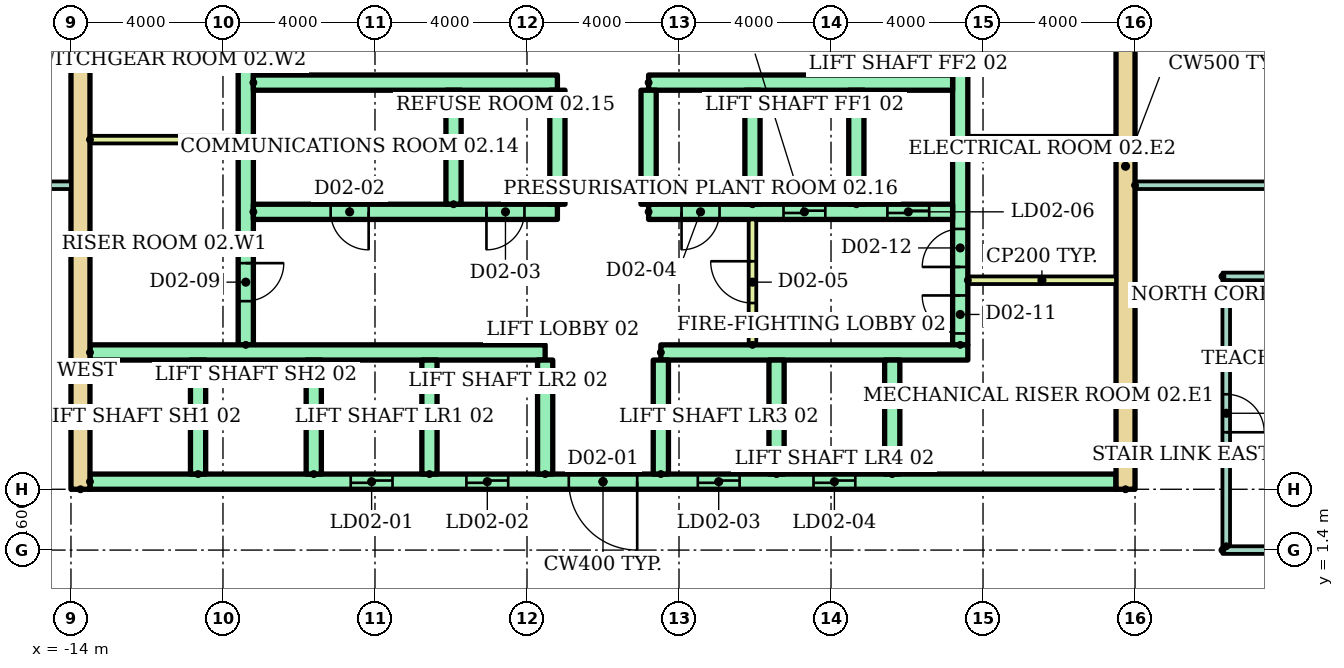
"""IFC4 building model, lengths in metres.
Left out: names, types, materials, properties, quantities, classifications, styles, units other than length and angle.
Written with IfcOpenShell. Run it as: python <this file> out.ifc"""

import sys

from ifc_helpers import new_model, si_unit, direction, frame, frame_2d, origin, place, context, subcontext, project, spatial, rectangle, extrude, element, fill, save


model = new_model("IFC4")
c1 = context("Model", 3, precision=1e-05, world=origin(), true_north=direction((0.0, 1.0)))
c2 = subcontext(c1, "Body", "Model", "MODEL_VIEW")
j1 = project(units=[si_unit("LENGTHUNIT", "METRE"), si_unit("PLANEANGLEUNIT", "RADIAN")], contexts=[c1])
p1 = place(None, origin())
s1 = spatial("IfcSite", under=j1, at=p1, CompositionType="ELEMENT")
p2 = place(p1, origin())
s2 = spatial("IfcBuilding", under=s1, at=p2, CompositionType="ELEMENT")
p3 = place(p2, frame((0.0, 0.0, 10.0)))
s3 = spatial("IfcBuildingStorey", under=s2, at=p3, CompositionType="ELEMENT", Elevation=10.0)
for number, where, z_axis, x_axis in (
    (1, (-13.75, 3.0, 0.0), (0.0, 0.0, 1.0), (0.0, 1.0, 0.0)),
    (2, (13.75, 3.0, 0.0), (0.0, 0.0, 1.0), (0.0, 1.0, 0.0)),
):
    element("IfcWall", number, at=place(p3, frame(where, z_axis=z_axis, x_axis=x_axis)), inside=s3, PredefinedType="SHEAR", context=c2, shape_type="SweptSolid", body=[
        extrude(rectangle(XDim=17.0, YDim=0.5, at=frame_2d((8.5, 0.0))), origin(), (0.0, 0.0, 1.0), 3.7),
    ])
p4 = place(p3, frame((-9.4, 6.8, 0.0), z_axis=(0.0, 0.0, 1.0), x_axis=(0.0, 1.0, 0.0)))
e3 = element("IfcWall", 3, at=p4, inside=s3, PredefinedType="SHEAR", context=c2, shape_type="SweptSolid", body=[
    extrude(rectangle(XDim=12.7, YDim=0.4, at=frame_2d((6.35, 0.0))), origin(), (0.0, 0.0, 1.0), 3.7),
])
p5 = place(p4, frame((1.15, 0.0, 0.0)))
e4 = element("IfcOpeningElement", 4, at=p5, cuts=e3, PredefinedType="OPENING", context=c2, shape_type="SweptSolid", body=[
    extrude(rectangle(XDim=1.0, YDim=2.1, at=frame_2d((0.5, 1.05))), frame((0.0, 0.21, 0.0), z_axis=(0.0, -1.0, 0.0), x_axis=(1.0, 0.0, 0.0)), (0.0, 0.0, 1.0), 0.42),
])
p6 = place(p4, frame((7.925, 0.0, 0.0)))
e5 = element("IfcOpeningElement", 5, at=p6, cuts=e3, PredefinedType="OPENING", context=c2, shape_type="SweptSolid", body=[
    extrude(rectangle(XDim=1.0, YDim=2.1, at=frame_2d((0.5, 1.05))), frame((0.0, 0.21, 0.0), z_axis=(0.0, -1.0, 0.0), x_axis=(1.0, 0.0, 0.0)), (0.0, 0.0, 1.0), 0.42),
])
p7 = place(p3, frame((9.4, 6.8, 0.0), z_axis=(0.0, 0.0, 1.0), x_axis=(0.0, 1.0, 0.0)))
e6 = element("IfcWall", 6, at=p7, inside=s3, PredefinedType="SHEAR", context=c2, shape_type="SweptSolid", body=[
    extrude(rectangle(XDim=12.7, YDim=0.4, at=frame_2d((6.35, 0.0))), origin(), (0.0, 0.0, 1.0), 3.7),
])
p8 = place(p7, frame((0.3, 0.0, 0.0)))
e7 = element("IfcOpeningElement", 7, at=p8, cuts=e6, PredefinedType="OPENING", context=c2, shape_type="SweptSolid", body=[
    extrude(rectangle(XDim=1.0, YDim=2.1, at=frame_2d((0.5, 1.05))), frame((0.0, 0.21, 0.0), z_axis=(0.0, -1.0, 0.0), x_axis=(1.0, 0.0, 0.0)), (0.0, 0.0, 1.0), 0.42),
])
p9 = place(p7, frame((2.05, 0.0, 0.0)))
e8 = element("IfcOpeningElement", 8, at=p9, cuts=e6, PredefinedType="OPENING", context=c2, shape_type="SweptSolid", body=[
    extrude(rectangle(XDim=1.0, YDim=2.1, at=frame_2d((0.5, 1.05))), frame((0.0, 0.21, 0.0), z_axis=(0.0, -1.0, 0.0), x_axis=(1.0, 0.0, 0.0)), (0.0, 0.0, 1.0), 0.42),
])
p10 = place(p7, frame((7.925, 0.0, 0.0)))
e9 = element("IfcOpeningElement", 9, at=p10, cuts=e6, PredefinedType="OPENING", context=c2, shape_type="SweptSolid", body=[
    extrude(rectangle(XDim=1.0, YDim=2.1, at=frame_2d((0.5, 1.05))), frame((0.0, 0.21, 0.0), z_axis=(0.0, -1.0, 0.0), x_axis=(1.0, 0.0, 0.0)), (0.0, 0.0, 1.0), 0.42),
])
p11 = place(p3, frame((-13.5, 3.2, 0.0)))
e10 = element("IfcWall", 10, at=p11, inside=s3, PredefinedType="SHEAR", context=c2, shape_type="SweptSolid", body=[
    extrude(rectangle(XDim=27.0, YDim=0.4, at=frame_2d((13.5, 0.0))), origin(), (0.0, 0.0, 1.0), 3.7),
])
p12 = place(p11, frame((6.861, 0.0, 0.0)))
e11 = element("IfcOpeningElement", 11, at=p12, cuts=e10, PredefinedType="OPENING", context=c2, shape_type="SweptSolid", body=[
    extrude(rectangle(XDim=1.1, YDim=2.1, at=frame_2d((0.55, 1.05))), frame((0.0, 0.21, 0.0), z_axis=(0.0, -1.0, 0.0), x_axis=(1.0, 0.0, 0.0)), (0.0, 0.0, 1.0), 0.42),
])
p13 = place(p11, frame((9.906, 0.0, 0.0)))
e12 = element("IfcOpeningElement", 12, at=p13, cuts=e10, PredefinedType="OPENING", context=c2, shape_type="SweptSolid", body=[
    extrude(rectangle(XDim=1.1, YDim=2.1, at=frame_2d((0.55, 1.05))), frame((0.0, 0.21, 0.0), z_axis=(0.0, -1.0, 0.0), x_axis=(1.0, 0.0, 0.0)), (0.0, 0.0, 1.0), 0.42),
])
p14 = place(p11, frame((15.994, 0.0, 0.0)))
e13 = element("IfcOpeningElement", 13, at=p14, cuts=e10, PredefinedType="OPENING", context=c2, shape_type="SweptSolid", body=[
    extrude(rectangle(XDim=1.1, YDim=2.1, at=frame_2d((0.55, 1.05))), frame((0.0, 0.21, 0.0), z_axis=(0.0, -1.0, 0.0), x_axis=(1.0, 0.0, 0.0)), (0.0, 0.0, 1.0), 0.42),
])
p15 = place(p11, frame((19.039, 0.0, 0.0)))
e14 = element("IfcOpeningElement", 14, at=p15, cuts=e10, PredefinedType="OPENING", context=c2, shape_type="SweptSolid", body=[
    extrude(rectangle(XDim=1.1, YDim=2.1, at=frame_2d((0.55, 1.05))), frame((0.0, 0.21, 0.0), z_axis=(0.0, -1.0, 0.0), x_axis=(1.0, 0.0, 0.0)), (0.0, 0.0, 1.0), 0.42),
])
p16 = place(p11, frame((12.6, 0.0, 0.0)))
e15 = element("IfcOpeningElement", 15, at=p16, cuts=e10, PredefinedType="OPENING", context=c2, shape_type="SweptSolid", body=[
    extrude(rectangle(XDim=1.8, YDim=2.1, at=frame_2d((0.9, 1.05))), frame((0.0, 0.21, 0.0), z_axis=(0.0, -1.0, 0.0), x_axis=(1.0, 0.0, 0.0)), (0.0, 0.0, 1.0), 0.42),
])
p17 = place(p3, frame((-13.5, 6.6, 0.0)))
e16 = element("IfcWall", 16, at=p17, inside=s3, PredefinedType="SHEAR", context=c2, shape_type="SweptSolid", body=[
    extrude(rectangle(XDim=11.978, YDim=0.4, at=frame_2d((5.989, 0.0))), origin(), (0.0, 0.0, 1.0), 3.7),
])
p18 = place(p3, frame((1.522, 6.6, 0.0)))
e17 = element("IfcWall", 17, at=p18, inside=s3, PredefinedType="SHEAR", context=c2, shape_type="SweptSolid", body=[
    extrude(rectangle(XDim=8.078, YDim=0.4, at=frame_2d((4.039, 0.0))), origin(), (0.0, 0.0, 1.0), 3.7),
])
for number, where, z_axis, x_axis in (
    (18, (-10.656, 3.4, 0.0), (0.0, 0.0, 1.0), (0.0, 1.0, 0.0)),
    (19, (-7.611, 3.4, 0.0), (0.0, 0.0, 1.0), (0.0, 1.0, 0.0)),
    (20, (-4.567, 3.4, 0.0), (0.0, 0.0, 1.0), (0.0, 1.0, 0.0)),
    (21, (-1.522, 3.4, 0.0), (0.0, 0.0, 1.0), (0.0, 1.0, 0.0)),
    (22, (1.522, 3.4, 0.0), (0.0, 0.0, 1.0), (0.0, 1.0, 0.0)),
    (23, (4.567, 3.4, 0.0), (0.0, 0.0, 1.0), (0.0, 1.0, 0.0)),
    (24, (7.611, 3.4, 0.0), (0.0, 0.0, 1.0), (0.0, 1.0, 0.0)),
):
    element("IfcWall", number, at=place(p3, frame(where, z_axis=z_axis, x_axis=x_axis)), inside=s3, PredefinedType="SHEAR", context=c2, shape_type="SweptSolid", body=[
        extrude(rectangle(XDim=3.0, YDim=0.4, at=frame_2d((1.5, 0.0))), origin(), (0.0, 0.0, 1.0), 3.7),
    ])
p19 = place(p3, frame((-9.2, 10.3, 0.0)))
e25 = element("IfcWall", 25, at=p19, inside=s3, PredefinedType="SHEAR", context=c2, shape_type="SweptSolid", body=[
    extrude(rectangle(XDim=8.0, YDim=0.4, at=frame_2d((4.0, 0.0))), origin(), (0.0, 0.0, 1.0), 3.7),
])
p20 = place(p19, frame((2.033, 0.0, 0.0)))
e26 = element("IfcOpeningElement", 26, at=p20, cuts=e25, PredefinedType="OPENING", context=c2, shape_type="SweptSolid", body=[
    extrude(rectangle(XDim=1.0, YDim=2.1, at=frame_2d((0.5, 1.05))), frame((0.0, 0.21, 0.0), z_axis=(0.0, -1.0, 0.0), x_axis=(1.0, 0.0, 0.0)), (0.0, 0.0, 1.0), 0.42),
])
p21 = place(p19, frame((6.133, 0.0, 0.0)))
e27 = element("IfcOpeningElement", 27, at=p21, cuts=e25, PredefinedType="OPENING", context=c2, shape_type="SweptSolid", body=[
    extrude(rectangle(XDim=1.0, YDim=2.1, at=frame_2d((0.5, 1.05))), frame((0.0, 0.21, 0.0), z_axis=(0.0, -1.0, 0.0), x_axis=(1.0, 0.0, 0.0)), (0.0, 0.0, 1.0), 0.42),
])
p22 = place(p3, frame((-9.2, 13.7, 0.0)))
e28 = element("IfcWall", 28, at=p22, inside=s3, PredefinedType="SHEAR", context=c2, shape_type="SweptSolid", body=[
    extrude(rectangle(XDim=8.0, YDim=0.4, at=frame_2d((4.0, 0.0))), origin(), (0.0, 0.0, 1.0), 3.7),
])
p23 = place(p3, frame((1.2, 10.3, 0.0)))
e29 = element("IfcWall", 29, at=p23, inside=s3, PredefinedType="SHEAR", context=c2, shape_type="SweptSolid", body=[
    extrude(rectangle(XDim=8.0, YDim=0.4, at=frame_2d((4.0, 0.0))), origin(), (0.0, 0.0, 1.0), 3.7),
])
p24 = place(p23, frame((3.55, 0.0, 0.0)))
e30 = element("IfcOpeningElement", 30, at=p24, cuts=e29, PredefinedType="OPENING", context=c2, shape_type="SweptSolid", body=[
    extrude(rectangle(XDim=1.1, YDim=2.1, at=frame_2d((0.55, 1.05))), frame((0.0, 0.21, 0.0), z_axis=(0.0, -1.0, 0.0), x_axis=(1.0, 0.0, 0.0)), (0.0, 0.0, 1.0), 0.42),
])
p25 = place(p23, frame((6.283, 0.0, 0.0)))
e31 = element("IfcOpeningElement", 31, at=p25, cuts=e29, PredefinedType="OPENING", context=c2, shape_type="SweptSolid", body=[
    extrude(rectangle(XDim=1.1, YDim=2.1, at=frame_2d((0.55, 1.05))), frame((0.0, 0.21, 0.0), z_axis=(0.0, -1.0, 0.0), x_axis=(1.0, 0.0, 0.0)), (0.0, 0.0, 1.0), 0.42),
])
p26 = place(p23, frame((0.867, 0.0, 0.0)))
e32 = element("IfcOpeningElement", 32, at=p26, cuts=e29, PredefinedType="OPENING", context=c2, shape_type="SweptSolid", body=[
    extrude(rectangle(XDim=1.0, YDim=2.1, at=frame_2d((0.5, 1.05))), frame((0.0, 0.21, 0.0), z_axis=(0.0, -1.0, 0.0), x_axis=(1.0, 0.0, 0.0)), (0.0, 0.0, 1.0), 0.42),
])
p27 = place(p3, frame((1.2, 13.7, 0.0)))
e33 = element("IfcWall", 33, at=p27, inside=s3, PredefinedType="SHEAR", context=c2, shape_type="SweptSolid", body=[
    extrude(rectangle(XDim=8.0, YDim=0.4, at=frame_2d((4.0, 0.0))), origin(), (0.0, 0.0, 1.0), 3.7),
])
for number, where, z_axis, x_axis in (
    (34, (-3.933, 10.5, 0.0), (0.0, 0.0, 1.0), (0.0, 1.0, 0.0)),
    (35, (-1.2, 10.5, 0.0), (0.0, 0.0, 1.0), (0.0, 1.0, 0.0)),
    (36, (1.2, 10.5, 0.0), (0.0, 0.0, 1.0), (0.0, 1.0, 0.0)),
    (37, (3.933, 10.5, 0.0), (0.0, 0.0, 1.0), (0.0, 1.0, 0.0)),
    (38, (6.667, 10.5, 0.0), (0.0, 0.0, 1.0), (0.0, 1.0, 0.0)),
):
    element("IfcWall", number, at=place(p3, frame(where, z_axis=z_axis, x_axis=x_axis)), inside=s3, PredefinedType="SHEAR", context=c2, shape_type="SweptSolid", body=[
        extrude(rectangle(XDim=3.0, YDim=0.4, at=frame_2d((1.5, 0.0))), origin(), (0.0, 0.0, 1.0), 3.7),
    ])
p28 = place(p3, frame((3.933, 6.8, 0.0), z_axis=(0.0, 0.0, 1.0), x_axis=(0.0, 1.0, 0.0)))
e39 = element("IfcWall", 39, at=p28, inside=s3, PredefinedType="PARTITIONING", context=c2, shape_type="SweptSolid", body=[
    extrude(rectangle(XDim=3.3, YDim=0.2, at=frame_2d((1.65, 0.0))), origin(), (0.0, 0.0, 1.0), 3.7),
])
p29 = place(p28, frame((1.1, 0.0, 0.0)))
e40 = element("IfcOpeningElement", 40, at=p29, cuts=e39, PredefinedType="OPENING", context=c2, shape_type="SweptSolid", body=[
    extrude(rectangle(XDim=1.1, YDim=2.1, at=frame_2d((0.55, 1.05))), frame((0.0, 0.11, 0.0), z_axis=(0.0, -1.0, 0.0), x_axis=(1.0, 0.0, 0.0)), (0.0, 0.0, 1.0), 0.22),
])
for number, where in (
    (41, (-13.5, 12.2, 0.0)),
    (42, (9.6, 8.5, 0.0)),
    (43, (9.6, 12.2, 0.0)),
):
    element("IfcWall", number, at=place(p3, frame(where)), inside=s3, PredefinedType="PARTITIONING", context=c2, shape_type="SweptSolid", body=[
        extrude(rectangle(XDim=3.9, YDim=0.2, at=frame_2d((1.95, 0.0))), origin(), (0.0, 0.0, 1.0), 3.7),
    ])
p30 = place(p3, frame((16.3, 1.4, 0.0)))
e44 = element("IfcWall", 44, at=p30, inside=s3, PredefinedType="PARTITIONING", context=c2, shape_type="SweptSolid", body=[
    extrude(rectangle(XDim=20.6, YDim=0.2, at=frame_2d((10.3, 0.0))), origin(), (0.0, 0.0, 1.0), 3.7),
])
p31 = place(p30, frame((8.05, 0.0, 0.0)))
e45 = element("IfcOpeningElement", 45, at=p31, cuts=e44, PredefinedType="OPENING", context=c2, shape_type="SweptSolid", body=[
    extrude(rectangle(XDim=1.0, YDim=2.1, at=frame_2d((0.5, 1.05))), frame((0.0, 0.11, 0.0), z_axis=(0.0, -1.0, 0.0), x_axis=(1.0, 0.0, 0.0)), (0.0, 0.0, 1.0), 0.22),
])
p32 = place(p30, frame((12.4, 0.0, 0.0)))
e46 = element("IfcOpeningElement", 46, at=p32, cuts=e44, PredefinedType="OPENING", context=c2, shape_type="SweptSolid", body=[
    extrude(rectangle(XDim=1.0, YDim=2.1, at=frame_2d((0.5, 1.05))), frame((0.0, 0.11, 0.0), z_axis=(0.0, -1.0, 0.0), x_axis=(1.0, 0.0, 0.0)), (0.0, 0.0, 1.0), 0.22),
])
p33 = place(p30, frame((16.05, 0.0, 0.0)))
e47 = element("IfcOpeningElement", 47, at=p33, cuts=e44, PredefinedType="OPENING", context=c2, shape_type="SweptSolid", body=[
    extrude(rectangle(XDim=1.0, YDim=2.1, at=frame_2d((0.5, 1.05))), frame((0.0, 0.11, 0.0), z_axis=(0.0, -1.0, 0.0), x_axis=(1.0, 0.0, 0.0)), (0.0, 0.0, 1.0), 0.22),
])
p34 = place(p3, frame((16.3, 8.6, 0.0)))
e48 = element("IfcWall", 48, at=p34, inside=s3, PredefinedType="PARTITIONING", context=c2, shape_type="SweptSolid", body=[
    extrude(rectangle(XDim=21.3, YDim=0.2, at=frame_2d((10.65, 0.0))), origin(), (0.0, 0.0, 1.0), 3.7),
])
p35 = place(p3, frame((-21.5, 11.0, 0.0)))
e49 = element("IfcWall", 49, at=p35, inside=s3, PredefinedType="PARTITIONING", context=c2, shape_type="SweptSolid", body=[
    extrude(rectangle(XDim=7.5, YDim=0.2, at=frame_2d((3.75, 0.0))), origin(), (0.0, 0.0, 1.0), 3.7),
])
p36 = place(p35, frame((0.35, 0.0, 0.0)))
e50 = element("IfcOpeningElement", 50, at=p36, cuts=e49, PredefinedType="OPENING", context=c2, shape_type="SweptSolid", body=[
    extrude(rectangle(XDim=1.0, YDim=2.1, at=frame_2d((0.5, 1.05))), frame((0.0, 0.11, 0.0), z_axis=(0.0, -1.0, 0.0), x_axis=(1.0, 0.0, 0.0)), (0.0, 0.0, 1.0), 0.22),
])
p37 = place(p35, frame((4.14, 0.0, 0.0)))
e51 = element("IfcOpeningElement", 51, at=p37, cuts=e49, PredefinedType="OPENING", context=c2, shape_type="SweptSolid", body=[
    extrude(rectangle(XDim=1.0, YDim=2.1, at=frame_2d((0.5, 1.05))), frame((0.0, 0.11, 0.0), z_axis=(0.0, -1.0, 0.0), x_axis=(1.0, 0.0, 0.0)), (0.0, 0.0, 1.0), 0.22),
])
p38 = place(p3, frame((14.0, 11.0, 0.0)))
e52 = element("IfcWall", 52, at=p38, inside=s3, PredefinedType="PARTITIONING", context=c2, shape_type="SweptSolid", body=[
    extrude(rectangle(XDim=3.5, YDim=0.2, at=frame_2d((1.75, 0.0))), origin(), (0.0, 0.0, 1.0), 3.7),
])
p39 = place(p3, frame((16.4, 1.5, 0.0), z_axis=(0.0, 0.0, 1.0), x_axis=(0.0, 1.0, 0.0)))
e53 = element("IfcWall", 53, at=p39, inside=s3, PredefinedType="PARTITIONING", context=c2, shape_type="SweptSolid", body=[
    extrude(rectangle(XDim=7.0, YDim=0.2, at=frame_2d((3.5, 0.0))), origin(), (0.0, 0.0, 1.0), 3.7),
])
p40 = place(p39, frame((3.0, 0.0, 0.0)))
e54 = element("IfcOpeningElement", 54, at=p40, cuts=e53, PredefinedType="OPENING", context=c2, shape_type="SweptSolid", body=[
    extrude(rectangle(XDim=1.0, YDim=2.1, at=frame_2d((0.5, 1.05))), frame((0.0, 0.11, 0.0), z_axis=(0.0, -1.0, 0.0), x_axis=(1.0, 0.0, 0.0)), (0.0, 0.0, 1.0), 0.22),
])
p41 = place(p12, origin())
e55 = element("IfcDoor", 55, at=p41, inside=s3, OperationType="SLIDING_TO_LEFT", PredefinedType="DOOR", context=c2, shape_type="SweptSolid", body=[
    extrude(rectangle(XDim=1.1, YDim=2.1, at=frame_2d((0.55, 1.05))), frame((0.0, 0.025, 0.0), z_axis=(0.0, -1.0, 0.0), x_axis=(1.0, 0.0, 0.0)), (0.0, 0.0, 1.0), 0.05),
])
fill(e11, e55)
p42 = place(p13, origin())
e56 = element("IfcDoor", 56, at=p42, inside=s3, OperationType="SLIDING_TO_LEFT", PredefinedType="DOOR", context=c2, shape_type="SweptSolid", body=[
    extrude(rectangle(XDim=1.1, YDim=2.1, at=frame_2d((0.55, 1.05))), frame((0.0, 0.025, 0.0), z_axis=(0.0, -1.0, 0.0), x_axis=(1.0, 0.0, 0.0)), (0.0, 0.0, 1.0), 0.05),
])
fill(e12, e56)
p43 = place(p14, origin())
e57 = element("IfcDoor", 57, at=p43, inside=s3, OperationType="SLIDING_TO_LEFT", PredefinedType="DOOR", context=c2, shape_type="SweptSolid", body=[
    extrude(rectangle(XDim=1.1, YDim=2.1, at=frame_2d((0.55, 1.05))), frame((0.0, 0.025, 0.0), z_axis=(0.0, -1.0, 0.0), x_axis=(1.0, 0.0, 0.0)), (0.0, 0.0, 1.0), 0.05),
])
fill(e13, e57)
p44 = place(p15, origin())
e58 = element("IfcDoor", 58, at=p44, inside=s3, OperationType="SLIDING_TO_LEFT", PredefinedType="DOOR", context=c2, shape_type="SweptSolid", body=[
    extrude(rectangle(XDim=1.1, YDim=2.1, at=frame_2d((0.55, 1.05))), frame((0.0, 0.025, 0.0), z_axis=(0.0, -1.0, 0.0), x_axis=(1.0, 0.0, 0.0)), (0.0, 0.0, 1.0), 0.05),
])
fill(e14, e58)
p45 = place(p16, frame((1.8, 0.0, 0.0), z_axis=(0.0, 0.0, 1.0), x_axis=(-1.0, 0.0, 0.0)))
e59 = element("IfcDoor", 59, at=p45, inside=s3, OperationType="DOUBLE_DOOR_SINGLE_SWING", PredefinedType="DOOR", context=c2, shape_type="SweptSolid", body=[
    extrude(rectangle(XDim=1.8, YDim=2.1, at=frame_2d((0.9, 1.05))), frame((0.0, 0.025, 0.0), z_axis=(0.0, -1.0, 0.0), x_axis=(1.0, 0.0, 0.0)), (0.0, 0.0, 1.0), 0.05),
])
fill(e15, e59)
p46 = place(p24, origin())
e60 = element("IfcDoor", 60, at=p46, inside=s3, OperationType="SLIDING_TO_LEFT", PredefinedType="DOOR", context=c2, shape_type="SweptSolid", body=[
    extrude(rectangle(XDim=1.1, YDim=2.1, at=frame_2d((0.55, 1.05))), frame((0.0, 0.025, 0.0), z_axis=(0.0, -1.0, 0.0), x_axis=(1.0, 0.0, 0.0)), (0.0, 0.0, 1.0), 0.05),
])
fill(e30, e60)
p47 = place(p25, origin())
e61 = element("IfcDoor", 61, at=p47, inside=s3, OperationType="SLIDING_TO_LEFT", PredefinedType="DOOR", context=c2, shape_type="SweptSolid", body=[
    extrude(rectangle(XDim=1.1, YDim=2.1, at=frame_2d((0.55, 1.05))), frame((0.0, 0.025, 0.0), z_axis=(0.0, -1.0, 0.0), x_axis=(1.0, 0.0, 0.0)), (0.0, 0.0, 1.0), 0.05),
])
fill(e31, e61)
p48 = place(p20, frame((1.0, 0.0, 0.0), z_axis=(0.0, 0.0, 1.0), x_axis=(-1.0, 0.0, 0.0)))
e62 = element("IfcDoor", 62, at=p48, inside=s3, OperationType="SINGLE_SWING_RIGHT", PredefinedType="DOOR", context=c2, shape_type="SweptSolid", body=[
    extrude(rectangle(XDim=1.0, YDim=2.1, at=frame_2d((0.5, 1.05))), frame((0.0, 0.025, 0.0), z_axis=(0.0, -1.0, 0.0), x_axis=(1.0, 0.0, 0.0)), (0.0, 0.0, 1.0), 0.05),
])
fill(e26, e62)
p49 = place(p21, frame((1.0, 0.0, 0.0), z_axis=(0.0, 0.0, 1.0), x_axis=(-1.0, 0.0, 0.0)))
e63 = element("IfcDoor", 63, at=p49, inside=s3, OperationType="SINGLE_SWING_LEFT", PredefinedType="DOOR", context=c2, shape_type="SweptSolid", body=[
    extrude(rectangle(XDim=1.0, YDim=2.1, at=frame_2d((0.5, 1.05))), frame((0.0, 0.025, 0.0), z_axis=(0.0, -1.0, 0.0), x_axis=(1.0, 0.0, 0.0)), (0.0, 0.0, 1.0), 0.05),
])
fill(e27, e63)
p50 = place(p26, frame((1.0, 0.0, 0.0), z_axis=(0.0, 0.0, 1.0), x_axis=(-1.0, 0.0, 0.0)))
e64 = element("IfcDoor", 64, at=p50, inside=s3, OperationType="SINGLE_SWING_LEFT", PredefinedType="DOOR", context=c2, shape_type="SweptSolid", body=[
    extrude(rectangle(XDim=1.0, YDim=2.1, at=frame_2d((0.5, 1.05))), frame((0.0, 0.025, 0.0), z_axis=(0.0, -1.0, 0.0), x_axis=(1.0, 0.0, 0.0)), (0.0, 0.0, 1.0), 0.05),
])
fill(e32, e64)
p51 = place(p29, origin())
e65 = element("IfcDoor", 65, at=p51, inside=s3, OperationType="SINGLE_SWING_RIGHT", PredefinedType="DOOR", context=c2, shape_type="SweptSolid", body=[
    extrude(rectangle(XDim=1.1, YDim=2.1, at=frame_2d((0.55, 1.05))), frame((0.0, 0.025, 0.0), z_axis=(0.0, -1.0, 0.0), x_axis=(1.0, 0.0, 0.0)), (0.0, 0.0, 1.0), 0.05),
])
fill(e40, e65)
p52 = place(p5, frame((1.0, 0.0, 0.0), z_axis=(0.0, 0.0, 1.0), x_axis=(-1.0, 0.0, 0.0)))
e66 = element("IfcDoor", 66, at=p52, inside=s3, OperationType="SINGLE_SWING_RIGHT", PredefinedType="DOOR", context=c2, shape_type="SweptSolid", body=[
    extrude(rectangle(XDim=1.0, YDim=2.1, at=frame_2d((0.5, 1.05))), frame((0.0, 0.025, 0.0), z_axis=(0.0, -1.0, 0.0), x_axis=(1.0, 0.0, 0.0)), (0.0, 0.0, 1.0), 0.05),
])
fill(e4, e66)
p53 = place(p8, origin())
e67 = element("IfcDoor", 67, at=p53, inside=s3, OperationType="SINGLE_SWING_RIGHT", PredefinedType="DOOR", context=c2, shape_type="SweptSolid", body=[
    extrude(rectangle(XDim=1.0, YDim=2.1, at=frame_2d((0.5, 1.05))), frame((0.0, 0.025, 0.0), z_axis=(0.0, -1.0, 0.0), x_axis=(1.0, 0.0, 0.0)), (0.0, 0.0, 1.0), 0.05),
])
fill(e7, e67)
p54 = place(p9, origin())
e68 = element("IfcDoor", 68, at=p54, inside=s3, OperationType="SINGLE_SWING_LEFT", PredefinedType="DOOR", context=c2, shape_type="SweptSolid", body=[
    extrude(rectangle(XDim=1.0, YDim=2.1, at=frame_2d((0.5, 1.05))), frame((0.0, 0.025, 0.0), z_axis=(0.0, -1.0, 0.0), x_axis=(1.0, 0.0, 0.0)), (0.0, 0.0, 1.0), 0.05),
])
fill(e8, e68)
p55 = place(p40, frame((1.0, 0.0, 0.0), z_axis=(0.0, 0.0, 1.0), x_axis=(-1.0, 0.0, 0.0)))
e69 = element("IfcDoor", 69, at=p55, inside=s3, OperationType="SINGLE_SWING_LEFT", PredefinedType="DOOR", context=c2, shape_type="SweptSolid", body=[
    extrude(rectangle(XDim=1.0, YDim=2.1, at=frame_2d((0.5, 1.05))), frame((0.0, 0.025, 0.0), z_axis=(0.0, -1.0, 0.0), x_axis=(1.0, 0.0, 0.0)), (0.0, 0.0, 1.0), 0.05),
])
fill(e54, e69)
save(model, sys.argv[1])
